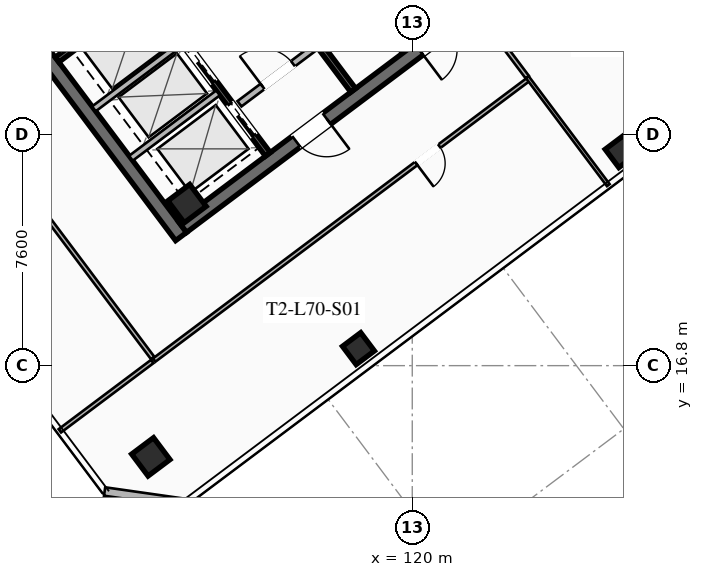
"""IFC4 building model, lengths in metres.
Left out: names, types, materials, properties, quantities, classifications, styles, units other than length and angle.
Written with IfcOpenShell. Run it as: python <this file> out.ifc"""

import sys

from ifc_helpers import new_model, si_unit, direction, frame, frame_2d, origin, origin_2d, place, context, subcontext, project, spatial, rectangle, hollow_rectangle, extrude, element, fill, save


model = new_model("IFC4")
c1 = context("Model", 3, precision=1e-05, world=origin(), true_north=direction((0.0, 1.0)))
c2 = subcontext(c1, "Body", "Model", "MODEL_VIEW")
j1 = project(units=[si_unit("LENGTHUNIT", "METRE"), si_unit("PLANEANGLEUNIT", "RADIAN")], contexts=[c1])
p1 = place(None, origin())
s1 = spatial("IfcSite", under=j1, at=p1, CompositionType="ELEMENT")
p2 = place(p1, origin())
s2 = spatial("IfcBuilding", under=s1, at=p2, CompositionType="ELEMENT")
p3 = place(p2, frame((0.0, 0.0, 259.4)))
s3 = spatial("IfcBuildingStorey", under=s2, at=p3, CompositionType="ELEMENT", Elevation=259.4)
p4 = place(p3, frame((112.396, 21.047, 0.0), z_axis=(0.0, 0.0, 1.0), x_axis=(-0.600005007985, 0.799996243986, 0.0)))
e1 = element("IfcWall", 1, at=p4, inside=s3, PredefinedType="SHEAR", context=c2, shape_type="SweptSolid", body=[
    extrude(rectangle(XDim=15.6, YDim=0.45, at=frame_2d((7.8, 0.0))), origin(), (0.0, 0.0, 1.0), 4.0),
])
p5 = place(p3, frame((124.649, 30.518, 0.0), z_axis=(0.0, 0.0, 1.0), x_axis=(-0.8, -0.6, 0.0)))
e2 = element("IfcWall", 2, at=p5, inside=s3, PredefinedType="SHEAR", context=c2, shape_type="SweptSolid", body=[
    extrude(rectangle(XDim=15.26, YDim=0.45, at=frame_2d((7.63, 0.0))), origin(), (0.0, 0.0, 1.0), 4.0),
])
p6 = place(p5, frame((9.33, 0.0, 0.0)))
e3 = element("IfcOpeningElement", 3, at=p6, cuts=e2, PredefinedType="OPENING", context=c2, shape_type="SweptSolid", body=[
    extrude(rectangle(XDim=1.25, YDim=2.25, at=frame_2d((0.625, 1.125))), frame((0.0, 0.235, 0.0), z_axis=(0.0, -1.0, 0.0), x_axis=(1.0, 0.0, 0.0)), (0.0, 0.0, 1.0), 0.47),
])
p7 = place(p5, frame((4.28, 0.0, 0.0)))
e4 = element("IfcOpeningElement", 4, at=p7, cuts=e2, PredefinedType="OPENING", context=c2, shape_type="SweptSolid", body=[
    extrude(rectangle(XDim=1.25, YDim=2.25, at=frame_2d((0.625, 1.125))), frame((0.0, 0.235, 0.0), z_axis=(0.0, -1.0, 0.0), x_axis=(1.0, 0.0, 0.0)), (0.0, 0.0, 1.0), 0.47),
])
for number, where, z_axis, x_axis in (
    (5, (112.59, 22.13, 0.0), (0.0, 0.0, 1.0), (0.8, 0.6, 0.0)),
    (6, (111.4, 13.8, 0.0), (0.0, 0.0, 1.0), (0.8, 0.6, 0.0)),
):
    element("IfcColumn", number, at=place(p3, frame(where, z_axis=z_axis, x_axis=x_axis)), inside=s3, PredefinedType="COLUMN", context=c2, shape_type="SweptSolid", body=[
        extrude(hollow_rectangle(XDim=0.9, YDim=0.9, WallThickness=0.04, at=origin_2d()), origin(), (0.0, 0.0, 1.0), 3.7),
    ])
for number, where, z_axis, x_axis in (
    (7, (118.23, 17.36, 0.0), (0.0, 0.0, 1.0), (0.8, 0.6, 0.0)),
    (8, (126.87, 23.84, 0.0), (0.0, 0.0, 1.0), (0.8, 0.6, 0.0)),
):
    element("IfcColumn", number, at=place(p3, frame(where, z_axis=z_axis, x_axis=x_axis)), inside=s3, PredefinedType="COLUMN", context=c2, shape_type="SweptSolid", body=[
        extrude(hollow_rectangle(XDim=0.75, YDim=0.75, WallThickness=0.032, at=origin_2d()), origin(), (0.0, 0.0, 1.0), 3.7),
    ])
p8 = place(p3, frame((112.54, 12.28, 0.0), z_axis=(0.0, 0.0, 1.0), x_axis=(-0.989956760759, 0.141370477216, 0.0)))
e9 = element("IfcWall", 9, at=p8, inside=s3, PredefinedType="SOLIDWALL", context=c2, shape_type="SweptSolid", body=[
    extrude(rectangle(XDim=2.687, YDim=0.28, at=frame_2d((1.344, 0.0))), origin(), (0.0, 0.0, 1.0), 3.7),
])
p9 = place(p3, frame((108.316, 26.862, 0.0), z_axis=(0.0, 0.0, 1.0), x_axis=(0.800014909178, 0.599980120581, 0.0)))
e10 = element("IfcWall", 10, at=p9, inside=s3, PredefinedType="SHEAR", context=c2, shape_type="SweptSolid", body=[
    extrude(rectangle(XDim=3.93, YDim=0.2, at=frame_2d((1.965, 0.0))), origin(), (0.0, 0.0, 1.0), 3.7),
])
p10 = place(p3, frame((118.058, 25.856, 0.0), z_axis=(0.0, 0.0, 1.0), x_axis=(-0.600002657301, 0.799998007018, 0.0)))
e11 = element("IfcWall", 11, at=p10, inside=s3, PredefinedType="SHEAR", context=c2, shape_type="SweptSolid", body=[
    extrude(rectangle(XDim=14.7, YDim=0.2, at=frame_2d((7.35, 0.0))), origin(), (0.0, 0.0, 1.0), 3.7),
])
p11 = place(p3, frame((114.316, 25.412, 0.0), z_axis=(0.0, 0.0, 1.0), x_axis=(0.800018601094, 0.59997519774, 0.0)))
e12 = element("IfcWall", 12, at=p11, inside=s3, PredefinedType="SOLIDWALL", context=c2, shape_type="SweptSolid", body=[
    extrude(rectangle(XDim=3.15, YDim=0.22, at=frame_2d((1.575, 0.0))), origin(), (0.0, 0.0, 1.0), 2.659),
])
p12 = place(p11, frame((0.95, 0.0, 0.0)))
e13 = element("IfcOpeningElement", 13, at=p12, cuts=e12, PredefinedType="OPENING", context=c2, shape_type="SweptSolid", body=[
    extrude(rectangle(XDim=1.25, YDim=2.25, at=frame_2d((0.625, 1.125))), frame((0.0, 0.12, 0.0), z_axis=(0.0, -1.0, 0.0), x_axis=(1.0, 0.0, 0.0)), (0.0, 0.0, 1.0), 0.24),
])
p13 = place(p3, frame((115.25, 23.75, 0.0), z_axis=(0.0, 0.0, 1.0), x_axis=(-0.599994036198, 0.800004472816, 0.0)))
e14 = element("IfcWall", 14, at=p13, inside=s3, PredefinedType="SHEAR", context=c2, shape_type="SweptSolid", body=[
    extrude(rectangle(XDim=6.55, YDim=0.2, at=frame_2d((3.275, 0.0))), origin(), (0.0, 0.0, 1.0), 3.7),
])
p14 = place(p13, frame((4.975, 0.0, 0.0)))
e15 = element("IfcOpeningElement", 15, at=p14, cuts=e14, PredefinedType="OPENING", context=c2, shape_type="SweptSolid", body=[
    extrude(rectangle(XDim=1.3, YDim=2.25, at=frame_2d((0.65, 1.125))), frame((0.0, 0.11, 0.0), z_axis=(0.0, -1.0, 0.0), x_axis=(1.0, 0.0, 0.0)), (0.0, 0.0, 1.0), 0.22),
])
p15 = place(p13, frame((2.975, 0.0, 0.0)))
e16 = element("IfcOpeningElement", 16, at=p15, cuts=e14, PredefinedType="OPENING", context=c2, shape_type="SweptSolid", body=[
    extrude(rectangle(XDim=1.3, YDim=2.25, at=frame_2d((0.65, 1.125))), frame((0.0, 0.11, 0.0), z_axis=(0.0, -1.0, 0.0), x_axis=(1.0, 0.0, 0.0)), (0.0, 0.0, 1.0), 0.22),
])
p16 = place(p13, frame((0.775, 0.0, 0.0)))
e17 = element("IfcOpeningElement", 17, at=p16, cuts=e14, PredefinedType="OPENING", context=c2, shape_type="SweptSolid", body=[
    extrude(rectangle(XDim=1.3, YDim=2.25, at=frame_2d((0.65, 1.125))), frame((0.0, 0.11, 0.0), z_axis=(0.0, -1.0, 0.0), x_axis=(1.0, 0.0, 0.0)), (0.0, 0.0, 1.0), 0.22),
])
for number, where, z_axis, x_axis in (
    (18, (110.746, 23.622, 0.0), (0.0, 0.0, 1.0), (0.8, 0.6, 0.0)),
    (19, (109.528, 25.246, 0.0), (0.0, 0.0, 1.0), (0.8, 0.6, 0.0)),
):
    element("IfcWall", number, at=place(p3, frame(where, z_axis=z_axis, x_axis=x_axis)), inside=s3, PredefinedType="SOLIDWALL", context=c2, shape_type="SweptSolid", body=[
        extrude(rectangle(XDim=3.58, YDim=0.2, at=frame_2d((1.79, 0.0))), origin(), (0.0, 0.0, 1.0), 3.7),
    ])
p17 = place(p3, frame((119.73, 27.11, 0.0), z_axis=(0.0, 0.0, 1.0), x_axis=(-0.600005580459, 0.799995814625, 0.0)))
e20 = element("IfcWall", 20, at=p17, inside=s3, PredefinedType="SOLIDWALL", context=c2, shape_type="SweptSolid", body=[
    extrude(rectangle(XDim=7.0, YDim=0.2, at=frame_2d((3.5, 0.0))), origin(), (0.0, 0.0, 1.0), 2.659),
])
p18 = place(p17, frame((0.85, 0.0, 0.0)))
e21 = element("IfcOpeningElement", 21, at=p18, cuts=e20, PredefinedType="OPENING", context=c2, shape_type="SweptSolid", body=[
    extrude(rectangle(XDim=0.95, YDim=2.05, at=frame_2d((0.475, 1.025))), frame((0.0, 0.11, 0.0), z_axis=(0.0, -1.0, 0.0), x_axis=(1.0, 0.0, 0.0)), (0.0, 0.0, 1.0), 0.22),
])
p19 = place(p17, frame((4.8, 0.0, 0.0)))
e22 = element("IfcOpeningElement", 22, at=p19, cuts=e20, PredefinedType="OPENING", context=c2, shape_type="SweptSolid", body=[
    extrude(rectangle(XDim=1.05, YDim=2.2, at=frame_2d((0.525, 1.1))), frame((0.0, 0.11, 0.0), z_axis=(0.0, -1.0, 0.0), x_axis=(1.0, 0.0, 0.0)), (0.0, 0.0, 1.0), 0.22),
])
p20 = place(p3, frame((123.832, 26.224, 0.0), z_axis=(0.0, 0.0, 1.0), x_axis=(-0.799994292853, -0.600007609454, 0.0)))
e23 = element("IfcWall", 23, at=p20, inside=s3, PredefinedType="PARTITIONING", context=c2, shape_type="SweptSolid", body=[
    extrude(rectangle(XDim=15.4, YDim=0.135, at=frame_2d((7.7, 0.0))), origin(), (0.0, 0.0, 1.0), 2.659),
])
p21 = place(p20, frame((3.676, 0.0, 0.0)))
e24 = element("IfcOpeningElement", 24, at=p21, cuts=e23, PredefinedType="OPENING", context=c2, shape_type="SweptSolid", body=[
    extrude(rectangle(XDim=0.95, YDim=2.05, at=frame_2d((0.475, 1.025))), frame((0.0, 0.077, 0.0), z_axis=(0.0, -1.0, 0.0), x_axis=(1.0, 0.0, 0.0)), (0.0, 0.0, 1.0), 0.155),
])
p22 = place(p3, frame((122.248, 28.336, 0.0), z_axis=(0.0, 0.0, 1.0), x_axis=(0.6, -0.8, 0.0)))
e25 = element("IfcWall", 25, at=p22, inside=s3, PredefinedType="PARTITIONING", context=c2, shape_type="SweptSolid", body=[
    extrude(rectangle(XDim=2.56, YDim=0.135, at=frame_2d((1.28, 0.0))), origin(), (0.0, 0.0, 1.0), 2.659),
])
p23 = place(p22, frame((0.25, 0.0, 0.0)))
e26 = element("IfcOpeningElement", 26, at=p23, cuts=e25, PredefinedType="OPENING", context=c2, shape_type="SweptSolid", body=[
    extrude(rectangle(XDim=0.95, YDim=2.05, at=frame_2d((0.475, 1.025))), frame((0.0, 0.077, 0.0), z_axis=(0.0, -1.0, 0.0), x_axis=(1.0, 0.0, 0.0)), (0.0, 0.0, 1.0), 0.155),
])
p24 = place(p3, frame((126.448, 22.736, 0.0), z_axis=(0.0, 0.0, 1.0), x_axis=(-0.600008797747, 0.799993401614, 0.0)))
e27 = element("IfcWall", 27, at=p24, inside=s3, PredefinedType="PARTITIONING", context=c2, shape_type="SweptSolid", body=[
    extrude(rectangle(XDim=4.44, YDim=0.11, at=frame_2d((2.22, 0.0))), origin(), (0.0, 0.0, 1.0), 2.659),
])
p25 = place(p3, frame((111.464, 17.048, 0.0), z_axis=(0.0, 0.0, 1.0), x_axis=(-0.600003983917, 0.799997012046, 0.0)))
e28 = element("IfcWall", 28, at=p25, inside=s3, PredefinedType="PARTITIONING", context=c2, shape_type="SweptSolid", body=[
    extrude(rectangle(XDim=19.61, YDim=0.135, at=frame_2d((9.805, 0.0))), origin(), (0.0, 0.0, 1.0), 2.659),
])
p26 = place(p25, frame((10.083, 0.0, 0.0)))
e29 = element("IfcOpeningElement", 29, at=p26, cuts=e28, PredefinedType="OPENING", context=c2, shape_type="SweptSolid", body=[
    extrude(rectangle(XDim=0.95, YDim=2.05, at=frame_2d((0.475, 1.025))), frame((0.0, 0.077, 0.0), z_axis=(0.0, -1.0, 0.0), x_axis=(1.0, 0.0, 0.0)), (0.0, 0.0, 1.0), 0.155),
])
p27 = place(p3, frame((108.408, 14.656, 0.0), z_axis=(0.0, 0.0, 1.0), x_axis=(0.8, 0.6, 0.0)))
e30 = element("IfcWall", 30, at=p27, inside=s3, PredefinedType="PARTITIONING", context=c2, shape_type="SweptSolid", body=[
    extrude(rectangle(XDim=3.8, YDim=0.135, at=frame_2d((1.9, 0.0))), origin(), (0.0, 0.0, 1.0), 2.659),
])
p28 = place(p6, origin())
e31 = element("IfcDoor", 31, at=p28, inside=s3, OperationType="SINGLE_SWING_LEFT", PredefinedType="DOOR", context=c2, shape_type="SweptSolid", body=[
    extrude(rectangle(XDim=1.25, YDim=2.25, at=frame_2d((0.625, 1.125))), frame((0.0, 0.025, 0.0), z_axis=(0.0, -1.0, 0.0), x_axis=(1.0, 0.0, 0.0)), (0.0, 0.0, 1.0), 0.05),
])
fill(e3, e31)
p29 = place(p12, origin())
e32 = element("IfcDoor", 32, at=p29, inside=s3, OperationType="SINGLE_SWING_LEFT", PredefinedType="DOOR", context=c2, shape_type="SweptSolid", body=[
    extrude(rectangle(XDim=1.25, YDim=2.25, at=frame_2d((0.625, 1.125))), frame((0.0, 0.025, 0.0), z_axis=(0.0, -1.0, 0.0), x_axis=(1.0, 0.0, 0.0)), (0.0, 0.0, 1.0), 0.05),
])
fill(e13, e32)
p30 = place(p21, origin())
e33 = element("IfcDoor", 33, at=p30, inside=s3, OperationType="SINGLE_SWING_RIGHT", PredefinedType="DOOR", context=c2, shape_type="SweptSolid", body=[
    extrude(rectangle(XDim=0.95, YDim=2.05, at=frame_2d((0.475, 1.025))), frame((0.0, 0.025, 0.0), z_axis=(0.0, -1.0, 0.0), x_axis=(1.0, 0.0, 0.0)), (0.0, 0.0, 1.0), 0.05),
])
fill(e24, e33)
p31 = place(p15, origin())
e34 = element("IfcDoor", 34, at=p31, inside=s3, OperationType="SLIDING_TO_LEFT", PredefinedType="DOOR", context=c2, shape_type="SweptSolid", body=[
    extrude(rectangle(XDim=1.3, YDim=2.25, at=frame_2d((0.65, 1.125))), frame((0.0, 0.025, 0.0), z_axis=(0.0, -1.0, 0.0), x_axis=(1.0, 0.0, 0.0)), (0.0, 0.0, 1.0), 0.05),
])
fill(e16, e34)
p32 = place(p16, origin())
e35 = element("IfcDoor", 35, at=p32, inside=s3, OperationType="SLIDING_TO_LEFT", PredefinedType="DOOR", context=c2, shape_type="SweptSolid", body=[
    extrude(rectangle(XDim=1.3, YDim=2.25, at=frame_2d((0.65, 1.125))), frame((0.0, 0.025, 0.0), z_axis=(0.0, -1.0, 0.0), x_axis=(1.0, 0.0, 0.0)), (0.0, 0.0, 1.0), 0.05),
])
fill(e17, e35)
save(model, sys.argv[1])
